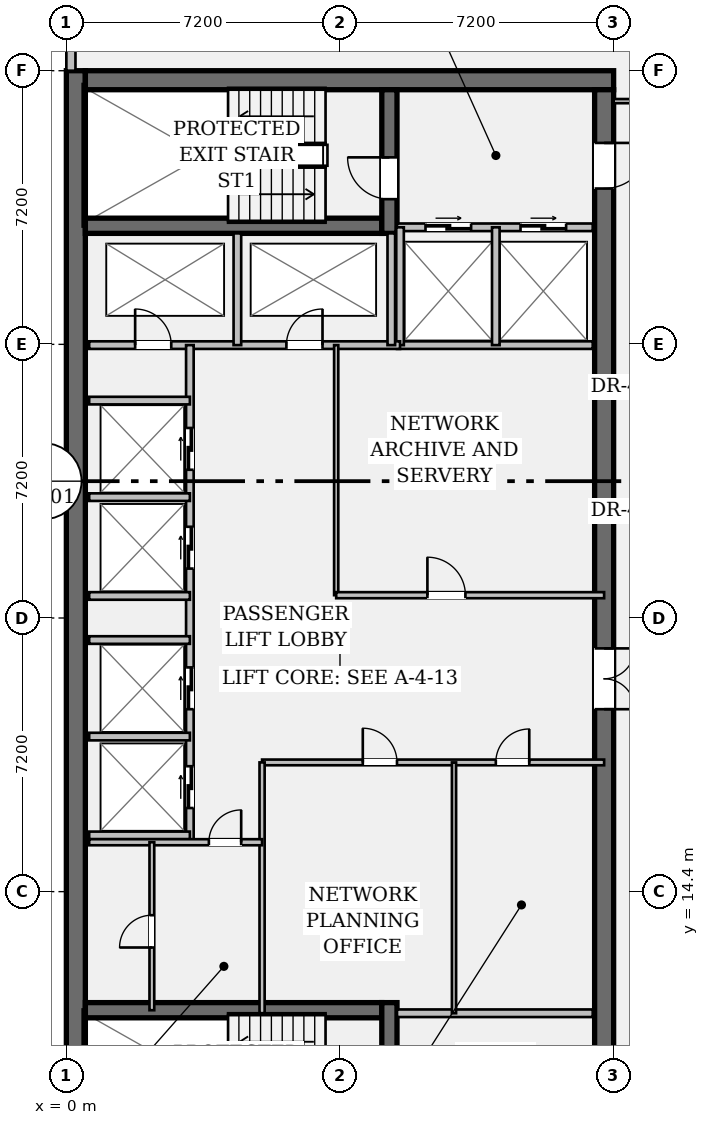
"""IFC4 building model, lengths in metres.
Left out: names, types, materials, properties, quantities, classifications, styles, units other than length and angle.
Written with IfcOpenShell. Run it as: python <this file> out.ifc"""

import sys

from ifc_helpers import new_model, si_unit, direction, frame, frame_2d, origin, place, context, subcontext, project, spatial, rectangle, extrude, element, fill, save


model = new_model("IFC4")
c1 = context("Model", 3, precision=1e-05, world=origin(), true_north=direction((0.0, 1.0)))
c2 = subcontext(c1, "Body", "Model", "MODEL_VIEW")
j1 = project(units=[si_unit("LENGTHUNIT", "METRE"), si_unit("PLANEANGLEUNIT", "RADIAN")], contexts=[c1])
p1 = place(None, origin())
s1 = spatial("IfcSite", under=j1, at=p1, CompositionType="ELEMENT")
p2 = place(p1, origin())
s2 = spatial("IfcBuilding", under=s1, at=p2, CompositionType="ELEMENT")
p3 = place(p2, frame((0.0, 0.0, 269.15)))
s3 = spatial("IfcBuildingStorey", under=s2, at=p3, CompositionType="ELEMENT", Elevation=269.15)
p4 = place(p3, frame((0.25, 7.2, 0.0), z_axis=(0.0, 0.0, 1.0), x_axis=(0.0, 1.0, 0.0)))
e1 = element("IfcWall", 1, at=p4, inside=s3, PredefinedType="SHEAR", context=c2, shape_type="SweptSolid", body=[
    extrude(rectangle(XDim=28.8, YDim=0.5, at=frame_2d((14.4, 0.0))), origin(), (0.0, 0.0, 1.0), 3.24),
])
p5 = place(p3, frame((0.5, 35.75, 0.0), z_axis=(0.0, 0.0, 1.0), x_axis=(1.0, 0.0, 0.0)))
e2 = element("IfcWall", 2, at=p5, inside=s3, PredefinedType="SHEAR", context=c2, shape_type="SweptSolid", body=[
    extrude(rectangle(XDim=13.9, YDim=0.5, at=frame_2d((6.95, 0.0))), origin(), (0.0, 0.0, 1.0), 3.24),
])
p6 = place(p3, frame((14.15, 35.5, 0.0), z_axis=(0.0, 0.0, 1.0), x_axis=(0.0, -1.0, 0.0)))
e3 = element("IfcWall", 3, at=p6, inside=s3, PredefinedType="SHEAR", context=c2, shape_type="SweptSolid", body=[
    extrude(rectangle(XDim=27.8, YDim=0.5, at=frame_2d((13.9, 0.0))), origin(), (0.0, 0.0, 1.0), 3.24),
])
p7 = place(p6, frame((1.4, 0.0, 0.0)))
e4 = element("IfcOpeningElement", 4, at=p7, cuts=e3, PredefinedType="OPENING", context=c2, shape_type="SweptSolid", body=[
    extrude(rectangle(XDim=1.2, YDim=2.15, at=frame_2d((0.6, 1.075))), frame((0.0, 0.262, 0.0), z_axis=(0.0, -1.0, 0.0), x_axis=(1.0, 0.0, 0.0)), (0.0, 0.0, 1.0), 0.524),
])
p8 = place(p6, frame((25.35, 0.0, 0.0)))
e5 = element("IfcOpeningElement", 5, at=p8, cuts=e3, PredefinedType="OPENING", context=c2, shape_type="SweptSolid", body=[
    extrude(rectangle(XDim=1.2, YDim=2.15, at=frame_2d((0.6, 1.075))), frame((0.0, 0.262, 0.0), z_axis=(0.0, -1.0, 0.0), x_axis=(1.0, 0.0, 0.0)), (0.0, 0.0, 1.0), 0.524),
])
p9 = place(p6, frame((14.7, 0.0, 0.0)))
e6 = element("IfcOpeningElement", 6, at=p9, cuts=e3, PredefinedType="OPENING", context=c2, shape_type="SweptSolid", body=[
    extrude(rectangle(XDim=1.6, YDim=2.2, at=frame_2d((0.8, 1.1))), frame((0.0, 0.262, 0.0), z_axis=(0.0, -1.0, 0.0), x_axis=(1.0, 0.0, 0.0)), (0.0, 0.0, 1.0), 0.524),
])
for number, where, z_axis, x_axis in (
    (7, (0.5, 31.92, 0.0), (0.0, 0.0, 1.0), (1.0, 0.0, 0.0)),
    (8, (0.5, 11.28, 0.0), (0.0, 0.0, 1.0), (1.0, 0.0, 0.0)),
):
    element("IfcWall", number, at=place(p3, frame(where, z_axis=z_axis, x_axis=x_axis)), inside=s3, PredefinedType="SHEAR", context=c2, shape_type="SweptSolid", body=[
        extrude(rectangle(XDim=7.8, YDim=0.4, at=frame_2d((3.9, 0.0))), origin(), (0.0, 0.0, 1.0), 3.24),
    ])
p10 = place(p3, frame((8.5, 31.72, 0.0), z_axis=(0.0, 0.0, 1.0), x_axis=(0.0, 1.0, 0.0)))
e9 = element("IfcWall", 9, at=p10, inside=s3, PredefinedType="SHEAR", context=c2, shape_type="SweptSolid", body=[
    extrude(rectangle(XDim=3.78, YDim=0.4, at=frame_2d((1.89, 0.0))), origin(), (0.0, 0.0, 1.0), 3.24),
])
p11 = place(p10, frame((0.9, 0.0, 0.0)))
e10 = element("IfcOpeningElement", 10, at=p11, cuts=e9, PredefinedType="OPENING", context=c2, shape_type="SweptSolid", body=[
    extrude(rectangle(XDim=1.1, YDim=2.15, at=frame_2d((0.55, 1.075))), frame((0.0, 0.212, 0.0), z_axis=(0.0, -1.0, 0.0), x_axis=(1.0, 0.0, 0.0)), (0.0, 0.0, 1.0), 0.424),
])
p12 = place(p3, frame((8.5, 7.7, 0.0), z_axis=(0.0, 0.0, 1.0), x_axis=(0.0, 1.0, 0.0)))
e11 = element("IfcWall", 11, at=p12, inside=s3, PredefinedType="SHEAR", context=c2, shape_type="SweptSolid", body=[
    extrude(rectangle(XDim=3.78, YDim=0.4, at=frame_2d((1.89, 0.0))), origin(), (0.0, 0.0, 1.0), 3.24),
])
p13 = place(p12, frame((0.85, 0.0, 0.0)))
e12 = element("IfcOpeningElement", 12, at=p13, cuts=e11, PredefinedType="OPENING", context=c2, shape_type="SweptSolid", body=[
    extrude(rectangle(XDim=1.1, YDim=2.15, at=frame_2d((0.55, 1.075))), frame((0.0, 0.212, 0.0), z_axis=(0.0, -1.0, 0.0), x_axis=(1.0, 0.0, 0.0)), (0.0, 0.0, 1.0), 0.424),
])
p14 = place(p3, frame((0.12, 36.0, 0.0), z_axis=(0.0, 0.0, 1.0), x_axis=(0.0, 1.0, 0.0)))
e13 = element("IfcWall", 13, at=p14, inside=s3, PredefinedType="STANDARD", context=c2, shape_type="SweptSolid", body=[
    extrude(rectangle(XDim=1.29, YDim=0.24, at=frame_2d((0.645, 0.0))), origin(), (0.0, 0.0, 1.0), 3.24),
])
p15 = place(p3, frame((8.7, 31.88, 0.0), z_axis=(0.0, 0.0, 1.0), x_axis=(1.0, 0.0, 0.0)))
e14 = element("IfcWall", 14, at=p15, inside=s3, PredefinedType="PARTITIONING", context=c2, shape_type="SweptSolid", body=[
    extrude(rectangle(XDim=5.15, YDim=0.2, at=frame_2d((2.575, 0.0))), origin(), (0.0, 0.0, 1.0), 3.24),
])
p16 = place(p15, frame((0.75, 0.0, 0.0)))
e15 = element("IfcOpeningElement", 15, at=p16, cuts=e14, PredefinedType="OPENING", context=c2, shape_type="SweptSolid", body=[
    extrude(rectangle(XDim=1.2, YDim=2.2, at=frame_2d((0.6, 1.1))), frame((0.0, 0.112, 0.0), z_axis=(0.0, -1.0, 0.0), x_axis=(1.0, 0.0, 0.0)), (0.0, 0.0, 1.0), 0.224),
])
p17 = place(p15, frame((3.25, 0.0, 0.0)))
e16 = element("IfcOpeningElement", 16, at=p17, cuts=e14, PredefinedType="OPENING", context=c2, shape_type="SweptSolid", body=[
    extrude(rectangle(XDim=1.2, YDim=2.2, at=frame_2d((0.6, 1.1))), frame((0.0, 0.112, 0.0), z_axis=(0.0, -1.0, 0.0), x_axis=(1.0, 0.0, 0.0)), (0.0, 0.0, 1.0), 0.224),
])
for number, where, z_axis, x_axis in (
    (17, (8.7, 11.2, 0.0), (0.0, 0.0, 1.0), (1.0, 0.0, 0.0)),
    (18, (8.7, 28.78, 0.0), (0.0, 0.0, 1.0), (1.0, 0.0, 0.0)),
):
    element("IfcWall", number, at=place(p3, frame(where, z_axis=z_axis, x_axis=x_axis)), inside=s3, PredefinedType="PARTITIONING", context=c2, shape_type="SweptSolid", body=[
        extrude(rectangle(XDim=5.15, YDim=0.2, at=frame_2d((2.575, 0.0))), origin(), (0.0, 0.0, 1.0), 3.24),
    ])
for number, where, z_axis, x_axis in (
    (19, (8.78, 28.78, 0.0), (0.0, 0.0, 1.0), (0.0, 1.0, 0.0)),
    (20, (11.3, 28.78, 0.0), (0.0, 0.0, 1.0), (0.0, 1.0, 0.0)),
):
    element("IfcWall", number, at=place(p3, frame(where, z_axis=z_axis, x_axis=x_axis)), inside=s3, PredefinedType="PARTITIONING", context=c2, shape_type="SweptSolid", body=[
        extrude(rectangle(XDim=3.1, YDim=0.2, at=frame_2d((1.55, 0.0))), origin(), (0.0, 0.0, 1.0), 3.24),
    ])
p18 = place(p3, frame((0.6, 28.78, 0.0), z_axis=(0.0, 0.0, 1.0), x_axis=(1.0, 0.0, 0.0)))
e21 = element("IfcWall", 21, at=p18, inside=s3, PredefinedType="PARTITIONING", context=c2, shape_type="SweptSolid", body=[
    extrude(rectangle(XDim=8.18, YDim=0.2, at=frame_2d((4.09, 0.0))), origin(), (0.0, 0.0, 1.0), 3.24),
])
p19 = place(p18, frame((1.21, 0.0, 0.0)))
e22 = element("IfcOpeningElement", 22, at=p19, cuts=e21, PredefinedType="OPENING", context=c2, shape_type="SweptSolid", body=[
    extrude(rectangle(XDim=0.95, YDim=2.15, at=frame_2d((0.475, 1.075))), frame((0.0, 0.112, 0.0), z_axis=(0.0, -1.0, 0.0), x_axis=(1.0, 0.0, 0.0)), (0.0, 0.0, 1.0), 0.224),
])
p20 = place(p18, frame((5.19, 0.0, 0.0)))
e23 = element("IfcOpeningElement", 23, at=p20, cuts=e21, PredefinedType="OPENING", context=c2, shape_type="SweptSolid", body=[
    extrude(rectangle(XDim=0.95, YDim=2.15, at=frame_2d((0.475, 1.075))), frame((0.0, 0.112, 0.0), z_axis=(0.0, -1.0, 0.0), x_axis=(1.0, 0.0, 0.0)), (0.0, 0.0, 1.0), 0.224),
])
for number, where, z_axis, x_axis in (
    (24, (4.5, 28.78, 0.0), (0.0, 0.0, 1.0), (0.0, 1.0, 0.0)),
    (25, (8.55, 28.78, 0.0), (0.0, 0.0, 1.0), (0.0, 1.0, 0.0)),
):
    element("IfcWall", number, at=place(p3, frame(where, z_axis=z_axis, x_axis=x_axis)), inside=s3, PredefinedType="PARTITIONING", context=c2, shape_type="SweptSolid", body=[
        extrude(rectangle(XDim=2.94, YDim=0.2, at=frame_2d((1.47, 0.0))), origin(), (0.0, 0.0, 1.0), 3.24),
    ])
p21 = place(p3, frame((3.25, 15.7, 0.0), z_axis=(0.0, 0.0, 1.0), x_axis=(0.0, 1.0, 0.0)))
e26 = element("IfcWall", 26, at=p21, inside=s3, PredefinedType="PARTITIONING", context=c2, shape_type="SweptSolid", body=[
    extrude(rectangle(XDim=13.08, YDim=0.2, at=frame_2d((6.54, 0.0))), origin(), (0.0, 0.0, 1.0), 3.24),
])
p22 = place(p21, frame((0.9, 0.0, 0.0)))
e27 = element("IfcOpeningElement", 27, at=p22, cuts=e26, PredefinedType="OPENING", context=c2, shape_type="SweptSolid", body=[
    extrude(rectangle(XDim=1.1, YDim=2.2, at=frame_2d((0.55, 1.1))), frame((0.0, 0.112, 0.0), z_axis=(0.0, -1.0, 0.0), x_axis=(1.0, 0.0, 0.0)), (0.0, 0.0, 1.0), 0.224),
])
p23 = place(p21, frame((3.5, 0.0, 0.0)))
e28 = element("IfcOpeningElement", 28, at=p23, cuts=e26, PredefinedType="OPENING", context=c2, shape_type="SweptSolid", body=[
    extrude(rectangle(XDim=1.1, YDim=2.2, at=frame_2d((0.55, 1.1))), frame((0.0, 0.112, 0.0), z_axis=(0.0, -1.0, 0.0), x_axis=(1.0, 0.0, 0.0)), (0.0, 0.0, 1.0), 0.224),
])
p24 = place(p21, frame((7.2, 0.0, 0.0)))
e29 = element("IfcOpeningElement", 29, at=p24, cuts=e26, PredefinedType="OPENING", context=c2, shape_type="SweptSolid", body=[
    extrude(rectangle(XDim=1.1, YDim=2.2, at=frame_2d((0.55, 1.1))), frame((0.0, 0.112, 0.0), z_axis=(0.0, -1.0, 0.0), x_axis=(1.0, 0.0, 0.0)), (0.0, 0.0, 1.0), 0.224),
])
p25 = place(p21, frame((9.8, 0.0, 0.0)))
e30 = element("IfcOpeningElement", 30, at=p25, cuts=e26, PredefinedType="OPENING", context=c2, shape_type="SweptSolid", body=[
    extrude(rectangle(XDim=1.1, YDim=2.2, at=frame_2d((0.55, 1.1))), frame((0.0, 0.112, 0.0), z_axis=(0.0, -1.0, 0.0), x_axis=(1.0, 0.0, 0.0)), (0.0, 0.0, 1.0), 0.224),
])
for number, where, z_axis, x_axis in (
    (31, (0.6, 15.88, 0.0), (0.0, 0.0, 1.0), (1.0, 0.0, 0.0)),
    (32, (0.6, 18.48, 0.0), (0.0, 0.0, 1.0), (1.0, 0.0, 0.0)),
    (33, (0.6, 22.18, 0.0), (0.0, 0.0, 1.0), (1.0, 0.0, 0.0)),
    (34, (0.6, 24.78, 0.0), (0.0, 0.0, 1.0), (1.0, 0.0, 0.0)),
    (35, (0.6, 21.02, 0.0), (0.0, 0.0, 1.0), (1.0, 0.0, 0.0)),
    (36, (0.6, 27.32, 0.0), (0.0, 0.0, 1.0), (1.0, 0.0, 0.0)),
):
    element("IfcWall", number, at=place(p3, frame(where, z_axis=z_axis, x_axis=x_axis)), inside=s3, PredefinedType="PARTITIONING", context=c2, shape_type="SweptSolid", body=[
        extrude(rectangle(XDim=2.65, YDim=0.2, at=frame_2d((1.325, 0.0))), origin(), (0.0, 0.0, 1.0), 3.24),
    ])
p26 = place(p3, frame((7.1, 22.2, 0.0), z_axis=(0.0, 0.0, 1.0), x_axis=(0.0, 1.0, 0.0)))
e37 = element("IfcWall", 37, at=p26, inside=s3, PredefinedType="PARTITIONING", context=c2, shape_type="SweptSolid", body=[
    extrude(rectangle(XDim=6.58, YDim=0.11, at=frame_2d((3.29, 0.0))), origin(), (0.0, 0.0, 1.0), 3.24),
])
p27 = place(p3, frame((7.1, 22.2, 0.0), z_axis=(0.0, 0.0, 1.0), x_axis=(1.0, 0.0, 0.0)))
e38 = element("IfcWall", 38, at=p27, inside=s3, PredefinedType="PARTITIONING", context=c2, shape_type="SweptSolid", body=[
    extrude(rectangle(XDim=7.05, YDim=0.16, at=frame_2d((3.525, 0.0))), origin(), (0.0, 0.0, 1.0), 3.24),
])
p28 = place(p27, frame((2.4, 0.0, 0.0)))
e39 = element("IfcOpeningElement", 39, at=p28, cuts=e38, PredefinedType="OPENING", context=c2, shape_type="SweptSolid", body=[
    extrude(rectangle(XDim=1.0, YDim=2.15, at=frame_2d((0.5, 1.075))), frame((0.0, 0.092, 0.0), z_axis=(0.0, -1.0, 0.0), x_axis=(1.0, 0.0, 0.0)), (0.0, 0.0, 1.0), 0.184),
])
p29 = place(p3, frame((5.15, 17.8, 0.0), z_axis=(0.0, 0.0, 1.0), x_axis=(1.0, 0.0, 0.0)))
e40 = element("IfcWall", 40, at=p29, inside=s3, PredefinedType="PARTITIONING", context=c2, shape_type="SweptSolid", body=[
    extrude(rectangle(XDim=9.0, YDim=0.15, at=frame_2d((4.5, 0.0))), origin(), (0.0, 0.0, 1.0), 3.24),
])
p30 = place(p29, frame((2.65, 0.0, 0.0)))
e41 = element("IfcOpeningElement", 41, at=p30, cuts=e40, PredefinedType="OPENING", context=c2, shape_type="SweptSolid", body=[
    extrude(rectangle(XDim=0.9, YDim=2.15, at=frame_2d((0.45, 1.075))), frame((0.0, 0.087, 0.0), z_axis=(0.0, -1.0, 0.0), x_axis=(1.0, 0.0, 0.0)), (0.0, 0.0, 1.0), 0.174),
])
p31 = place(p29, frame((6.15, 0.0, 0.0)))
e42 = element("IfcOpeningElement", 42, at=p31, cuts=e40, PredefinedType="OPENING", context=c2, shape_type="SweptSolid", body=[
    extrude(rectangle(XDim=0.88, YDim=2.15, at=frame_2d((0.44, 1.075))), frame((0.0, 0.087, 0.0), z_axis=(0.0, -1.0, 0.0), x_axis=(1.0, 0.0, 0.0)), (0.0, 0.0, 1.0), 0.174),
])
p32 = place(p3, frame((5.15, 11.2, 0.0), z_axis=(0.0, 0.0, 1.0), x_axis=(0.0, 1.0, 0.0)))
e43 = element("IfcWall", 43, at=p32, inside=s3, PredefinedType="PARTITIONING", context=c2, shape_type="SweptSolid", body=[
    extrude(rectangle(XDim=6.6, YDim=0.135, at=frame_2d((3.3, 0.0))), origin(), (0.0, 0.0, 1.0), 3.24),
])
p33 = place(p3, frame((10.2, 11.2, 0.0), z_axis=(0.0, 0.0, 1.0), x_axis=(0.0, 1.0, 0.0)))
e44 = element("IfcWall", 44, at=p33, inside=s3, PredefinedType="PARTITIONING", context=c2, shape_type="SweptSolid", body=[
    extrude(rectangle(XDim=6.6, YDim=0.11, at=frame_2d((3.3, 0.0))), origin(), (0.0, 0.0, 1.0), 3.24),
])
p34 = place(p3, frame((0.6, 15.7, 0.0), z_axis=(0.0, 0.0, 1.0), x_axis=(1.0, 0.0, 0.0)))
e45 = element("IfcWall", 45, at=p34, inside=s3, PredefinedType="PARTITIONING", context=c2, shape_type="SweptSolid", body=[
    extrude(rectangle(XDim=4.55, YDim=0.16, at=frame_2d((2.275, 0.0))), origin(), (0.0, 0.0, 1.0), 3.24),
])
p35 = place(p34, frame((3.15, 0.0, 0.0)))
e46 = element("IfcOpeningElement", 46, at=p35, cuts=e45, PredefinedType="OPENING", context=c2, shape_type="SweptSolid", body=[
    extrude(rectangle(XDim=0.85, YDim=2.15, at=frame_2d((0.425, 1.075))), frame((0.0, 0.092, 0.0), z_axis=(0.0, -1.0, 0.0), x_axis=(1.0, 0.0, 0.0)), (0.0, 0.0, 1.0), 0.184),
])
p36 = place(p3, frame((2.25, 11.28, 0.0), z_axis=(0.0, 0.0, 1.0), x_axis=(0.0, 1.0, 0.0)))
e47 = element("IfcWall", 47, at=p36, inside=s3, PredefinedType="PARTITIONING", context=c2, shape_type="SweptSolid", body=[
    extrude(rectangle(XDim=4.42, YDim=0.125, at=frame_2d((2.21, 0.0))), origin(), (0.0, 0.0, 1.0), 3.24),
])
p37 = place(p36, frame((1.65, 0.0, 0.0)))
e48 = element("IfcOpeningElement", 48, at=p37, cuts=e47, PredefinedType="OPENING", context=c2, shape_type="SweptSolid", body=[
    extrude(rectangle(XDim=0.85, YDim=2.15, at=frame_2d((0.425, 1.075))), frame((0.0, 0.074, 0.0), z_axis=(0.0, -1.0, 0.0), x_axis=(1.0, 0.0, 0.0)), (0.0, 0.0, 1.0), 0.149),
])
p38 = place(p3, frame((14.4, 35.2, 0.0), z_axis=(0.0, 0.0, 1.0), x_axis=(1.0, 0.0, 0.0)))
e49 = element("IfcWall", 49, at=p38, inside=s3, PredefinedType="PARTITIONING", context=c2, shape_type="SweptSolid", body=[
    extrude(rectangle(XDim=2.95, YDim=0.11, at=frame_2d((1.475, 0.0))), origin(), (0.0, 0.0, 1.0), 2.808),
])
p39 = place(p38, frame((0.95, 0.0, 0.0)))
e50 = element("IfcOpeningElement", 50, at=p39, cuts=e49, PredefinedType="OPENING", context=c2, shape_type="SweptSolid", body=[
    extrude(rectangle(XDim=1.0, YDim=2.15, at=frame_2d((0.5, 1.075))), frame((0.0, 0.067, 0.0), z_axis=(0.0, -1.0, 0.0), x_axis=(1.0, 0.0, 0.0)), (0.0, 0.0, 1.0), 0.134),
])
p40 = place(p11, origin())
e51 = element("IfcDoor", 51, at=p40, inside=s3, OperationType="SINGLE_SWING_RIGHT", PredefinedType="DOOR", context=c2, shape_type="SweptSolid", body=[
    extrude(rectangle(XDim=1.1, YDim=2.15, at=frame_2d((0.55, 1.075))), frame((0.0, 0.025, 0.0), z_axis=(0.0, -1.0, 0.0), x_axis=(1.0, 0.0, 0.0)), (0.0, 0.0, 1.0), 0.05),
])
fill(e10, e51)
p41 = place(p7, origin())
e52 = element("IfcDoor", 52, at=p41, inside=s3, OperationType="SINGLE_SWING_LEFT", PredefinedType="DOOR", context=c2, shape_type="SweptSolid", body=[
    extrude(rectangle(XDim=1.2, YDim=2.15, at=frame_2d((0.6, 1.075))), frame((0.0, 0.025, 0.0), z_axis=(0.0, -1.0, 0.0), x_axis=(1.0, 0.0, 0.0)), (0.0, 0.0, 1.0), 0.05),
])
fill(e4, e52)
p42 = place(p16, origin())
e53 = element("IfcDoor", 53, at=p42, inside=s3, OperationType="DOUBLE_DOOR_SLIDING", PredefinedType="DOOR", context=c2, shape_type="SweptSolid", body=[
    extrude(rectangle(XDim=1.2, YDim=2.2, at=frame_2d((0.6, 1.1))), frame((0.0, 0.025, 0.0), z_axis=(0.0, -1.0, 0.0), x_axis=(1.0, 0.0, 0.0)), (0.0, 0.0, 1.0), 0.05),
])
fill(e15, e53)
p43 = place(p17, origin())
e54 = element("IfcDoor", 54, at=p43, inside=s3, OperationType="DOUBLE_DOOR_SLIDING", PredefinedType="DOOR", context=c2, shape_type="SweptSolid", body=[
    extrude(rectangle(XDim=1.2, YDim=2.2, at=frame_2d((0.6, 1.1))), frame((0.0, 0.025, 0.0), z_axis=(0.0, -1.0, 0.0), x_axis=(1.0, 0.0, 0.0)), (0.0, 0.0, 1.0), 0.05),
])
fill(e16, e54)
p44 = place(p19, origin())
e55 = element("IfcDoor", 55, at=p44, inside=s3, OperationType="SINGLE_SWING_LEFT", PredefinedType="DOOR", context=c2, shape_type="SweptSolid", body=[
    extrude(rectangle(XDim=0.95, YDim=2.15, at=frame_2d((0.475, 1.075))), frame((0.0, 0.025, 0.0), z_axis=(0.0, -1.0, 0.0), x_axis=(1.0, 0.0, 0.0)), (0.0, 0.0, 1.0), 0.05),
])
fill(e22, e55)
p45 = place(p20, origin())
e56 = element("IfcDoor", 56, at=p45, inside=s3, OperationType="SINGLE_SWING_RIGHT", PredefinedType="DOOR", context=c2, shape_type="SweptSolid", body=[
    extrude(rectangle(XDim=0.95, YDim=2.15, at=frame_2d((0.475, 1.075))), frame((0.0, 0.025, 0.0), z_axis=(0.0, -1.0, 0.0), x_axis=(1.0, 0.0, 0.0)), (0.0, 0.0, 1.0), 0.05),
])
fill(e23, e56)
p46 = place(p9, origin())
e57 = element("IfcDoor", 57, at=p46, inside=s3, OperationType="DOUBLE_DOOR_SINGLE_SWING", PredefinedType="DOOR", context=c2, shape_type="SweptSolid", body=[
    extrude(rectangle(XDim=1.6, YDim=2.2, at=frame_2d((0.8, 1.1))), frame((0.0, 0.025, 0.0), z_axis=(0.0, -1.0, 0.0), x_axis=(1.0, 0.0, 0.0)), (0.0, 0.0, 1.0), 0.05),
])
fill(e6, e57)
p47 = place(p22, origin())
e58 = element("IfcDoor", 58, at=p47, inside=s3, OperationType="DOUBLE_DOOR_SLIDING", PredefinedType="DOOR", context=c2, shape_type="SweptSolid", body=[
    extrude(rectangle(XDim=1.1, YDim=2.2, at=frame_2d((0.55, 1.1))), frame((0.0, 0.025, 0.0), z_axis=(0.0, -1.0, 0.0), x_axis=(1.0, 0.0, 0.0)), (0.0, 0.0, 1.0), 0.05),
])
fill(e27, e58)
p48 = place(p23, origin())
e59 = element("IfcDoor", 59, at=p48, inside=s3, OperationType="DOUBLE_DOOR_SLIDING", PredefinedType="DOOR", context=c2, shape_type="SweptSolid", body=[
    extrude(rectangle(XDim=1.1, YDim=2.2, at=frame_2d((0.55, 1.1))), frame((0.0, 0.025, 0.0), z_axis=(0.0, -1.0, 0.0), x_axis=(1.0, 0.0, 0.0)), (0.0, 0.0, 1.0), 0.05),
])
fill(e28, e59)
p49 = place(p24, origin())
e60 = element("IfcDoor", 60, at=p49, inside=s3, OperationType="DOUBLE_DOOR_SLIDING", PredefinedType="DOOR", context=c2, shape_type="SweptSolid", body=[
    extrude(rectangle(XDim=1.1, YDim=2.2, at=frame_2d((0.55, 1.1))), frame((0.0, 0.025, 0.0), z_axis=(0.0, -1.0, 0.0), x_axis=(1.0, 0.0, 0.0)), (0.0, 0.0, 1.0), 0.05),
])
fill(e29, e60)
p50 = place(p25, origin())
e61 = element("IfcDoor", 61, at=p50, inside=s3, OperationType="DOUBLE_DOOR_SLIDING", PredefinedType="DOOR", context=c2, shape_type="SweptSolid", body=[
    extrude(rectangle(XDim=1.1, YDim=2.2, at=frame_2d((0.55, 1.1))), frame((0.0, 0.025, 0.0), z_axis=(0.0, -1.0, 0.0), x_axis=(1.0, 0.0, 0.0)), (0.0, 0.0, 1.0), 0.05),
])
fill(e30, e61)
p51 = place(p28, origin())
e62 = element("IfcDoor", 62, at=p51, inside=s3, OperationType="SINGLE_SWING_LEFT", PredefinedType="DOOR", context=c2, shape_type="SweptSolid", body=[
    extrude(rectangle(XDim=1.0, YDim=2.15, at=frame_2d((0.5, 1.075))), frame((0.0, 0.025, 0.0), z_axis=(0.0, -1.0, 0.0), x_axis=(1.0, 0.0, 0.0)), (0.0, 0.0, 1.0), 0.05),
])
fill(e39, e62)
p52 = place(p30, origin())
e63 = element("IfcDoor", 63, at=p52, inside=s3, OperationType="SINGLE_SWING_LEFT", PredefinedType="DOOR", context=c2, shape_type="SweptSolid", body=[
    extrude(rectangle(XDim=0.9, YDim=2.15, at=frame_2d((0.45, 1.075))), frame((0.0, 0.025, 0.0), z_axis=(0.0, -1.0, 0.0), x_axis=(1.0, 0.0, 0.0)), (0.0, 0.0, 1.0), 0.05),
])
fill(e41, e63)
p53 = place(p31, origin())
e64 = element("IfcDoor", 64, at=p53, inside=s3, OperationType="SINGLE_SWING_RIGHT", PredefinedType="DOOR", context=c2, shape_type="SweptSolid", body=[
    extrude(rectangle(XDim=0.88, YDim=2.15, at=frame_2d((0.44, 1.075))), frame((0.0, 0.025, 0.0), z_axis=(0.0, -1.0, 0.0), x_axis=(1.0, 0.0, 0.0)), (0.0, 0.0, 1.0), 0.05),
])
fill(e42, e64)
p54 = place(p35, origin())
e65 = element("IfcDoor", 65, at=p54, inside=s3, OperationType="SINGLE_SWING_RIGHT", PredefinedType="DOOR", context=c2, shape_type="SweptSolid", body=[
    extrude(rectangle(XDim=0.85, YDim=2.15, at=frame_2d((0.425, 1.075))), frame((0.0, 0.025, 0.0), z_axis=(0.0, -1.0, 0.0), x_axis=(1.0, 0.0, 0.0)), (0.0, 0.0, 1.0), 0.05),
])
fill(e46, e65)
p55 = place(p37, origin())
e66 = element("IfcDoor", 66, at=p55, inside=s3, OperationType="SINGLE_SWING_LEFT", PredefinedType="DOOR", context=c2, shape_type="SweptSolid", body=[
    extrude(rectangle(XDim=0.85, YDim=2.15, at=frame_2d((0.425, 1.075))), frame((0.0, 0.025, 0.0), z_axis=(0.0, -1.0, 0.0), x_axis=(1.0, 0.0, 0.0)), (0.0, 0.0, 1.0), 0.05),
])
fill(e48, e66)
save(model, sys.argv[1])
